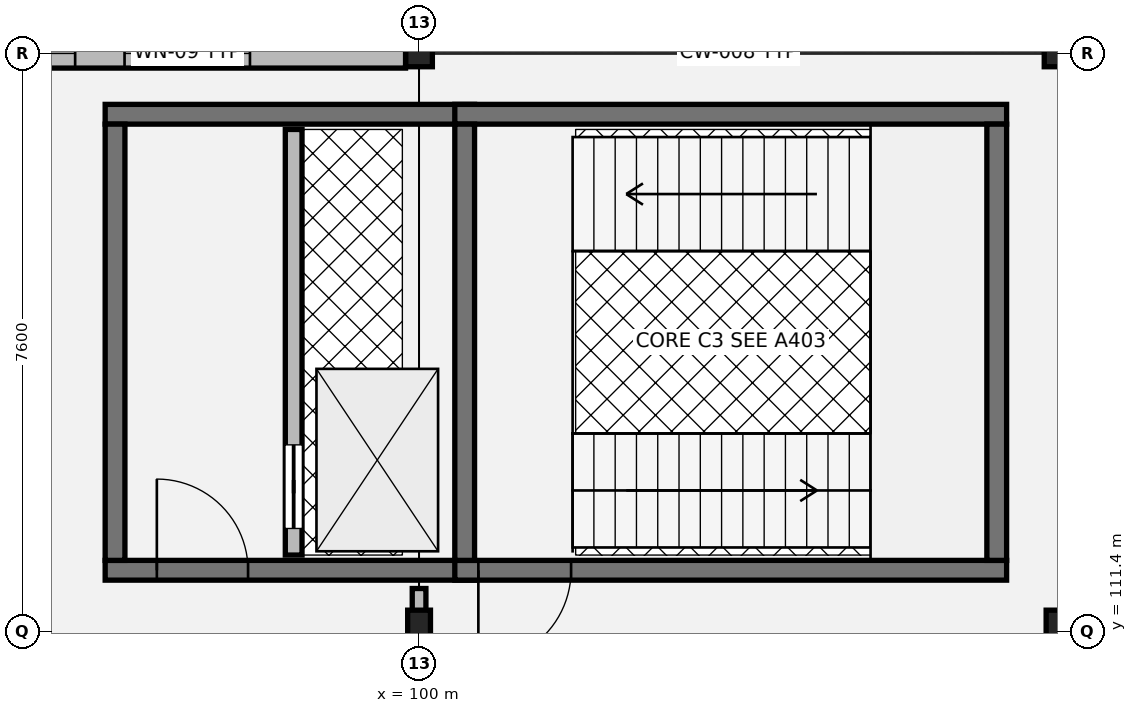
"""IFC4 building model, lengths in metres.
Left out: names, types, materials, properties, quantities, classifications, styles, units other than length and angle.
Written with IfcOpenShell. Run it as: python <this file> out.ifc"""

import sys

from ifc_helpers import new_model, si_unit, direction, frame, frame_2d, origin, origin_2d, place, context, subcontext, project, spatial, rectangle, hollow_rectangle, i_section, extrude, element, fill, save


model = new_model("IFC4")
c1 = context("Model", 3, precision=1e-05, world=origin(), true_north=direction((0.0, 1.0)))
c2 = subcontext(c1, "Body", "Model", "MODEL_VIEW")
j1 = project(units=[si_unit("LENGTHUNIT", "METRE"), si_unit("PLANEANGLEUNIT", "RADIAN")], contexts=[c1])
p1 = place(None, origin())
s1 = spatial("IfcSite", under=j1, at=p1, CompositionType="ELEMENT")
p2 = place(p1, origin())
s2 = spatial("IfcBuilding", under=s1, at=p2, CompositionType="ELEMENT")
p3 = place(p2, origin())
s3 = spatial("IfcBuildingStorey", under=s2, at=p3, CompositionType="ELEMENT", Elevation=0.0)
p4 = place(p3, frame((100.0, 111.4, 0.0), z_axis=(0.0, 0.0, 1.0), x_axis=(1.0, 0.0, 0.0)))
e1 = element("IfcColumn", 1, at=p4, inside=s3, PredefinedType="COLUMN", context=c2, shape_type="SweptSolid", body=[
    extrude(i_section(OverallWidth=0.3, OverallDepth=0.55, WebThickness=0.015, FlangeThickness=0.029, at=origin_2d()), origin(), (0.0, 0.0, 1.0), 5.075),
])
p5 = place(p3, frame((100.0, 119.0, 0.0), z_axis=(0.0, 0.0, 1.0), x_axis=(1.0, 0.0, 0.0)))
e2 = element("IfcColumn", 2, at=p5, inside=s3, PredefinedType="COLUMN", context=c2, shape_type="SweptSolid", body=[
    extrude(hollow_rectangle(XDim=0.35, YDim=0.35, WallThickness=0.014, at=origin_2d()), origin(), (0.0, 0.0, 1.0), 5.075),
])
p6 = place(p3, frame((108.4, 111.4, 0.0), z_axis=(0.0, 0.0, 1.0), x_axis=(1.0, 0.0, 0.0)))
e3 = element("IfcColumn", 3, at=p6, inside=s3, PredefinedType="COLUMN", context=c2, shape_type="SweptSolid", body=[
    extrude(i_section(OverallWidth=0.3, OverallDepth=0.55, WebThickness=0.015, FlangeThickness=0.029, at=origin_2d()), origin(), (0.0, 0.0, 1.0), 5.075),
])
p7 = place(p3, frame((108.4, 119.0, 0.0), z_axis=(0.0, 0.0, 1.0), x_axis=(1.0, 0.0, 0.0)))
e4 = element("IfcColumn", 4, at=p7, inside=s3, PredefinedType="COLUMN", context=c2, shape_type="SweptSolid", body=[
    extrude(hollow_rectangle(XDim=0.35, YDim=0.35, WallThickness=0.014, at=origin_2d()), origin(), (0.0, 0.0, 1.0), 5.075),
])
p8 = place(p3, frame((99.822, 119.0, 0.0), z_axis=(0.0, 0.0, 1.0), x_axis=(-1.0, 0.0, 0.0)))
e5 = element("IfcWall", 5, at=p8, inside=s3, PredefinedType="SOLIDWALL", context=c2, shape_type="SweptSolid", body=[
    extrude(rectangle(XDim=8.044, YDim=0.385, at=frame_2d((4.022, 0.0))), origin(), (0.0, 0.0, 1.0), 4.5),
])
p9 = place(p8, frame((2.047, 0.0, 0.8)))
e6 = element("IfcOpeningElement", 6, at=p9, cuts=e5, PredefinedType="OPENING", context=c2, shape_type="SweptSolid", body=[
    extrude(rectangle(XDim=1.65, YDim=2.25, at=frame_2d((0.825, 1.125))), frame((0.0, 0.202, 0.0), z_axis=(0.0, -1.0, 0.0), x_axis=(1.0, 0.0, 0.0)), (0.0, 0.0, 1.0), 0.405),
])
p10 = place(p8, frame((4.347, 0.0, 0.8)))
e7 = element("IfcOpeningElement", 7, at=p10, cuts=e5, PredefinedType="OPENING", context=c2, shape_type="SweptSolid", body=[
    extrude(rectangle(XDim=1.65, YDim=2.25, at=frame_2d((0.825, 1.125))), frame((0.0, 0.202, 0.0), z_axis=(0.0, -1.0, 0.0), x_axis=(1.0, 0.0, 0.0)), (0.0, 0.0, 1.0), 0.405),
])
p11 = place(p3, frame((95.87, 112.2, 0.0), z_axis=(0.0, 0.0, 1.0), x_axis=(1.0, 0.0, 0.0)))
e8 = element("IfcWall", 8, at=p11, inside=s3, PredefinedType="SHEAR", context=c2, shape_type="SweptSolid", body=[
    extrude(rectangle(XDim=4.86, YDim=0.26, at=frame_2d((2.43, 0.0))), origin(), (0.0, 0.0, 1.0), 4.865),
])
p12 = place(p11, frame((0.68, 0.0, 0.0)))
e9 = element("IfcOpeningElement", 9, at=p12, cuts=e8, PredefinedType="OPENING", context=c2, shape_type="SweptSolid", body=[
    extrude(rectangle(XDim=1.2, YDim=2.16, at=frame_2d((0.6, 1.08))), frame((0.0, 0.14, 0.0), z_axis=(0.0, -1.0, 0.0), x_axis=(1.0, 0.0, 0.0)), (0.0, 0.0, 1.0), 0.28),
])
p13 = place(p3, frame((100.73, 118.2, 0.0), z_axis=(0.0, 0.0, 1.0), x_axis=(-1.0, 0.0, 0.0)))
e10 = element("IfcWall", 10, at=p13, inside=s3, PredefinedType="SHEAR", context=c2, shape_type="SweptSolid", body=[
    extrude(rectangle(XDim=4.86, YDim=0.26, at=frame_2d((2.43, 0.0))), origin(), (0.0, 0.0, 1.0), 4.865),
])
p14 = place(p3, frame((96.0, 118.07, 0.0), z_axis=(0.0, 0.0, 1.0), x_axis=(0.0, -1.0, 0.0)))
e11 = element("IfcWall", 11, at=p14, inside=s3, PredefinedType="SHEAR", context=c2, shape_type="SweptSolid", body=[
    extrude(rectangle(XDim=5.74, YDim=0.26, at=frame_2d((2.87, 0.0))), origin(), (0.0, 0.0, 1.0), 4.865),
])
p15 = place(p3, frame((98.35, 112.4, 0.0), z_axis=(0.0, 0.0, 1.0), x_axis=(0.0, 1.0, 0.0)))
e12 = element("IfcWall", 12, at=p15, inside=s3, PredefinedType="SOLIDWALL", context=c2, shape_type="SweptSolid", body=[
    extrude(rectangle(XDim=5.6, YDim=0.22, at=frame_2d((2.8, 0.0))), origin(), (0.0, 0.0, 1.0), 4.865),
])
p16 = place(p15, frame((0.35, 0.0, 0.0)))
e13 = element("IfcOpeningElement", 13, at=p16, cuts=e12, PredefinedType="OPENING", context=c2, shape_type="SweptSolid", body=[
    extrude(rectangle(XDim=1.1, YDim=2.15, at=frame_2d((0.55, 1.075))), frame((0.0, 0.12, 0.0), z_axis=(0.0, -1.0, 0.0), x_axis=(1.0, 0.0, 0.0)), (0.0, 0.0, 1.0), 0.24),
])
p17 = place(p3, frame((100.47, 112.2, 0.0), z_axis=(0.0, 0.0, 1.0), x_axis=(1.0, 0.0, 0.0)))
e14 = element("IfcWall", 14, at=p17, inside=s3, PredefinedType="SHEAR", context=c2, shape_type="SweptSolid", body=[
    extrude(rectangle(XDim=7.26, YDim=0.26, at=frame_2d((3.63, 0.0))), origin(), (0.0, 0.0, 1.0), 4.865),
])
p18 = place(p17, frame((0.31, 0.0, 0.0)))
e15 = element("IfcOpeningElement", 15, at=p18, cuts=e14, PredefinedType="OPENING", context=c2, shape_type="SweptSolid", body=[
    extrude(rectangle(XDim=1.22, YDim=2.18, at=frame_2d((0.61, 1.09))), frame((0.0, 0.14, 0.0), z_axis=(0.0, -1.0, 0.0), x_axis=(1.0, 0.0, 0.0)), (0.0, 0.0, 1.0), 0.28),
])
p19 = place(p3, frame((100.47, 118.2, 0.0), z_axis=(0.0, 0.0, 1.0), x_axis=(1.0, 0.0, 0.0)))
e16 = element("IfcWall", 16, at=p19, inside=s3, PredefinedType="SHEAR", context=c2, shape_type="SweptSolid", body=[
    extrude(rectangle(XDim=7.26, YDim=0.26, at=frame_2d((3.63, 0.0))), origin(), (0.0, 0.0, 1.0), 4.865),
])
for number, where, z_axis, x_axis in (
    (17, (100.6, 112.33, 0.0), (0.0, 0.0, 1.0), (0.0, 1.0, 0.0)),
    (18, (107.6, 112.33, 0.0), (0.0, 0.0, 1.0), (0.0, 1.0, 0.0)),
):
    element("IfcWall", number, at=place(p3, frame(where, z_axis=z_axis, x_axis=x_axis)), inside=s3, PredefinedType="SHEAR", context=c2, shape_type="SweptSolid", body=[
        extrude(rectangle(XDim=5.74, YDim=0.26, at=frame_2d((2.87, 0.0))), origin(), (0.0, 0.0, 1.0), 4.865),
    ])
p20 = place(p3, frame((100.0, 111.64, 0.0), z_axis=(0.0, 0.0, 1.0), x_axis=(0.0, 1.0, 0.0)))
e19 = element("IfcWall", 19, at=p20, inside=s3, PredefinedType="PARTITIONING", context=c2, shape_type="SweptSolid", body=[
    extrude(rectangle(XDim=0.32, YDim=0.18, at=frame_2d((0.16, 0.0))), origin(), (0.0, 0.0, 1.0), 4.2),
])
p21 = place(p9, origin())
e20 = element("IfcWindow", 20, at=p21, inside=s3, PartitioningType="SINGLE_PANEL", PredefinedType="WINDOW", context=c2, shape_type="SweptSolid", body=[
    extrude(rectangle(XDim=1.65, YDim=2.25, at=frame_2d((0.825, 1.125))), frame((0.0, 0.03, 0.0), z_axis=(0.0, -1.0, 0.0), x_axis=(1.0, 0.0, 0.0)), (0.0, 0.0, 1.0), 0.06),
])
fill(e6, e20)
p22 = place(p10, origin())
e21 = element("IfcWindow", 21, at=p22, inside=s3, PartitioningType="SINGLE_PANEL", PredefinedType="WINDOW", context=c2, shape_type="SweptSolid", body=[
    extrude(rectangle(XDim=1.65, YDim=2.25, at=frame_2d((0.825, 1.125))), frame((0.0, 0.03, 0.0), z_axis=(0.0, -1.0, 0.0), x_axis=(1.0, 0.0, 0.0)), (0.0, 0.0, 1.0), 0.06),
])
fill(e7, e21)
p23 = place(p12, origin())
e22 = element("IfcDoor", 22, at=p23, inside=s3, OperationType="SINGLE_SWING_LEFT", PredefinedType="DOOR", context=c2, shape_type="SweptSolid", body=[
    extrude(rectangle(XDim=1.2, YDim=2.16, at=frame_2d((0.6, 1.08))), frame((0.0, 0.025, 0.0), z_axis=(0.0, -1.0, 0.0), x_axis=(1.0, 0.0, 0.0)), (0.0, 0.0, 1.0), 0.05),
])
fill(e9, e22)
p24 = place(p16, origin())
e23 = element("IfcDoor", 23, at=p24, inside=s3, OperationType="SLIDING_TO_LEFT", PredefinedType="DOOR", context=c2, shape_type="SweptSolid", body=[
    extrude(rectangle(XDim=1.1, YDim=2.15, at=frame_2d((0.55, 1.075))), frame((0.0, 0.025, 0.0), z_axis=(0.0, -1.0, 0.0), x_axis=(1.0, 0.0, 0.0)), (0.0, 0.0, 1.0), 0.05),
])
fill(e13, e23)
p25 = place(p18, origin())
e24 = element("IfcDoor", 24, at=p25, inside=s3, OperationType="SINGLE_SWING_RIGHT", PredefinedType="DOOR", context=c2, shape_type="SweptSolid", body=[
    extrude(rectangle(XDim=1.22, YDim=2.18, at=frame_2d((0.61, 1.09))), frame((0.0, 0.025, 0.0), z_axis=(0.0, -1.0, 0.0), x_axis=(1.0, 0.0, 0.0)), (0.0, 0.0, 1.0), 0.05),
])
fill(e15, e24)
save(model, sys.argv[1])
